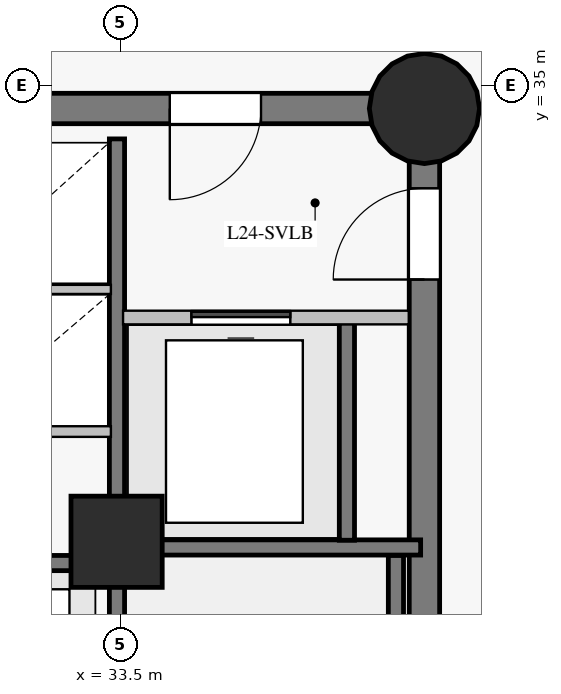
"""IFC4 building model, lengths in metres.
Left out: names, types, materials, properties, quantities, classifications, styles, units other than length and angle.
Written with IfcOpenShell. Run it as: python <this file> out.ifc"""

import sys

from ifc_helpers import new_model, si_unit, direction, frame, frame_2d, origin, origin_with_axes, origin_2d, place, context, subcontext, project, spatial, rectangle, circle, extrude, source, transform, mapped, element, fill, save


model = new_model("IFC4")
c1 = context("Model", 3, precision=1e-05, world=origin(), true_north=direction((0.0, 1.0)))
c2 = subcontext(c1, "Body", "Model", "MODEL_VIEW")
j1 = project(units=[si_unit("LENGTHUNIT", "METRE"), si_unit("PLANEANGLEUNIT", "RADIAN")], contexts=[c1])
p1 = place(None, origin())
s1 = spatial("IfcSite", under=j1, at=p1, CompositionType="ELEMENT")
p2 = place(p1, origin())
s2 = spatial("IfcBuilding", under=s1, at=p2, CompositionType="ELEMENT")
p3 = place(p2, frame((0.0, 0.0, 92.2)))
s3 = spatial("IfcBuildingStorey", under=s2, at=p3, CompositionType="ELEMENT", Elevation=92.2)
p4 = place(p3, frame((37.5, 18.3, 0.0), z_axis=(0.0, 0.0, 1.0), x_axis=(0.0, 1.0, 0.0)))
e1 = element("IfcWall", 1, at=p4, inside=s3, PredefinedType="SHEAR", context=c2, shape_type="SweptSolid", body=[
    extrude(rectangle(XDim=16.4, YDim=0.4, at=frame_2d((8.2, 0.0))), origin(), (0.0, 0.0, 1.0), 3.775),
])
p5 = place(p4, frame((14.15, 0.0, 0.0)))
e2 = element("IfcOpeningElement", 2, at=p5, cuts=e1, PredefinedType="OPENING", context=c2, shape_type="SweptSolid", body=[
    extrude(rectangle(XDim=1.2, YDim=2.15, at=frame_2d((0.6, 1.075))), frame((0.0, 0.21, 0.0), z_axis=(0.0, -1.0, 0.0), x_axis=(1.0, 0.0, 0.0)), (0.0, 0.0, 1.0), 0.42),
])
p6 = place(p3, frame((37.5, 34.7, 0.0), z_axis=(0.0, 0.0, 1.0), x_axis=(-1.0, 0.0, 0.0)))
e3 = element("IfcWall", 3, at=p6, inside=s3, PredefinedType="SHEAR", context=c2, shape_type="SweptSolid", body=[
    extrude(rectangle(XDim=10.95, YDim=0.4, at=frame_2d((5.475, 0.0))), origin(), (0.0, 0.0, 1.0), 3.775),
])
p7 = place(p6, frame((2.15, 0.0, 0.0)))
e4 = element("IfcOpeningElement", 4, at=p7, cuts=e3, PredefinedType="OPENING", context=c2, shape_type="SweptSolid", body=[
    extrude(rectangle(XDim=1.2, YDim=2.15, at=frame_2d((0.6, 1.075))), frame((0.0, 0.21, 0.0), z_axis=(0.0, -1.0, 0.0), x_axis=(1.0, 0.0, 0.0)), (0.0, 0.0, 1.0), 0.42),
])
p8 = place(p6, frame((6.35, 0.0, 0.0)))
e5 = element("IfcOpeningElement", 5, at=p8, cuts=e3, PredefinedType="OPENING", context=c2, shape_type="SweptSolid", body=[
    extrude(rectangle(XDim=1.1, YDim=2.15, at=frame_2d((0.55, 1.075))), frame((0.0, 0.21, 0.0), z_axis=(0.0, -1.0, 0.0), x_axis=(1.0, 0.0, 0.0)), (0.0, 0.0, 1.0), 0.42),
])
m1 = source(origin_with_axes(), c2, "Body", "SweptSolid", [
    extrude(circle(Radius=0.725, at=origin_2d()), origin(), (0.0, 0.0, 1.0), 4.0),
])
p9 = place(p3, frame((37.5, 34.7, 0.0), z_axis=(0.0, 0.0, 1.0), x_axis=(1.0, 0.0, 0.0)))
e6 = element("IfcColumn", 6, at=p9, inside=s3, PredefinedType="COLUMN", context=c2, shape_type="MappedRepresentation", body=[
    mapped(m1, transform((0.0, 0.0, 0.0), scale=1.0)),
])
m2 = source(origin_with_axes(), c2, "Body", "SweptSolid", [
    extrude(rectangle(XDim=1.2, YDim=1.2, at=origin_2d()), origin(), (0.0, 0.0, 1.0), 4.0),
])
p10 = place(p3, frame((33.45, 29.0, 0.0), z_axis=(0.0, 0.0, 1.0), x_axis=(1.0, 0.0, 0.0)))
e7 = element("IfcColumn", 7, at=p10, inside=s3, PredefinedType="COLUMN", context=c2, shape_type="MappedRepresentation", body=[
    mapped(m2, transform((0.0, 0.0, 0.0), scale=1.0)),
])
p11 = place(p3, frame((33.455, 18.7, 0.0), z_axis=(0.0, 0.0, 1.0), x_axis=(0.0, 1.0, 0.0)))
e8 = element("IfcWall", 8, at=p11, inside=s3, PredefinedType="SHEAR", context=c2, shape_type="SweptSolid", body=[
    extrude(rectangle(XDim=15.6, YDim=0.2, at=frame_2d((7.8, 0.0))), origin(), (0.0, 0.0, 1.0), 3.775),
])
p12 = place(p11, frame((2.75, 0.0, 0.0)))
e9 = element("IfcOpeningElement", 9, at=p12, cuts=e8, PredefinedType="OPENING", context=c2, shape_type="SweptSolid", body=[
    extrude(rectangle(XDim=1.15, YDim=2.15, at=frame_2d((0.575, 1.075))), frame((0.0, 0.11, 0.0), z_axis=(0.0, -1.0, 0.0), x_axis=(1.0, 0.0, 0.0)), (0.0, 0.0, 1.0), 0.22),
])
p13 = place(p11, frame((0.55, 0.0, 0.0)))
e10 = element("IfcOpeningElement", 10, at=p13, cuts=e8, PredefinedType="OPENING", context=c2, shape_type="SweptSolid", body=[
    extrude(rectangle(XDim=0.94, YDim=2.1, at=frame_2d((0.47, 1.05))), frame((0.0, 0.11, 0.0), z_axis=(0.0, -1.0, 0.0), x_axis=(1.0, 0.0, 0.0)), (0.0, 0.0, 1.0), 0.22),
])
p14 = place(p3, frame((23.7, 28.72, 0.0), z_axis=(0.0, 0.0, 1.0), x_axis=(1.0, 0.0, 0.0)))
e11 = element("IfcWall", 11, at=p14, inside=s3, PredefinedType="SHEAR", context=c2, shape_type="SweptSolid", body=[
    extrude(rectangle(XDim=9.6, YDim=0.2, at=frame_2d((4.8, 0.0))), origin(), (0.0, 0.0, 1.0), 3.775),
])
p15 = place(p14, frame((0.6, 0.0, 0.0)))
e12 = element("IfcOpeningElement", 12, at=p15, cuts=e11, PredefinedType="OPENING", context=c2, shape_type="SweptSolid", body=[
    extrude(rectangle(XDim=1.1, YDim=2.15, at=frame_2d((0.55, 1.075))), frame((0.0, 0.11, 0.0), z_axis=(0.0, -1.0, 0.0), x_axis=(1.0, 0.0, 0.0)), (0.0, 0.0, 1.0), 0.22),
])
p16 = place(p14, frame((2.98, 0.0, 0.0)))
e13 = element("IfcOpeningElement", 13, at=p16, cuts=e11, PredefinedType="OPENING", context=c2, shape_type="SweptSolid", body=[
    extrude(rectangle(XDim=1.1, YDim=2.15, at=frame_2d((0.55, 1.075))), frame((0.0, 0.11, 0.0), z_axis=(0.0, -1.0, 0.0), x_axis=(1.0, 0.0, 0.0)), (0.0, 0.0, 1.0), 0.22),
])
p17 = place(p14, frame((5.36, 0.0, 0.0)))
e14 = element("IfcOpeningElement", 14, at=p17, cuts=e11, PredefinedType="OPENING", context=c2, shape_type="SweptSolid", body=[
    extrude(rectangle(XDim=1.1, YDim=2.15, at=frame_2d((0.55, 1.075))), frame((0.0, 0.11, 0.0), z_axis=(0.0, -1.0, 0.0), x_axis=(1.0, 0.0, 0.0)), (0.0, 0.0, 1.0), 0.22),
])
p18 = place(p14, frame((7.74, 0.0, 0.0)))
e15 = element("IfcOpeningElement", 15, at=p18, cuts=e11, PredefinedType="OPENING", context=c2, shape_type="SweptSolid", body=[
    extrude(rectangle(XDim=1.1, YDim=2.15, at=frame_2d((0.55, 1.075))), frame((0.0, 0.11, 0.0), z_axis=(0.0, -1.0, 0.0), x_axis=(1.0, 0.0, 0.0)), (0.0, 0.0, 1.0), 0.22),
])
p19 = place(p3, frame((37.125, 21.32, 0.0), z_axis=(0.0, 0.0, 1.0), x_axis=(0.0, 1.0, 0.0)))
e16 = element("IfcWall", 16, at=p19, inside=s3, PredefinedType="SHEAR", context=c2, shape_type="SweptSolid", body=[
    extrude(rectangle(XDim=7.5, YDim=0.2, at=frame_2d((3.75, 0.0))), origin(), (0.0, 0.0, 1.0), 3.775),
])
p20 = place(p3, frame((33.455, 28.925, 0.0), z_axis=(0.0, 0.0, 1.0), x_axis=(1.0, 0.0, 0.0)))
e17 = element("IfcWall", 17, at=p20, inside=s3, PredefinedType="SHEAR", context=c2, shape_type="SweptSolid", body=[
    extrude(rectangle(XDim=3.995, YDim=0.2, at=frame_2d((1.998, 0.0))), origin(), (0.0, 0.0, 1.0), 3.775),
])
p21 = place(p3, frame((36.48, 29.02, 0.0), z_axis=(0.0, 0.0, 1.0), x_axis=(0.0, 1.0, 0.0)))
e18 = element("IfcWall", 18, at=p21, inside=s3, PredefinedType="SHEAR", context=c2, shape_type="SweptSolid", body=[
    extrude(rectangle(XDim=2.86, YDim=0.2, at=frame_2d((1.43, 0.0))), origin(), (0.0, 0.0, 1.0), 3.775),
])
p22 = place(p3, frame((33.535, 31.95, 0.0), z_axis=(0.0, 0.0, 1.0), x_axis=(1.0, 0.0, 0.0)))
e19 = element("IfcWall", 19, at=p22, inside=s3, PredefinedType="PARTITIONING", context=c2, shape_type="SweptSolid", body=[
    extrude(rectangle(XDim=3.759, YDim=0.18, at=frame_2d((1.879, 0.0))), origin(), (0.0, 0.0, 1.0), 3.775),
])
p23 = place(p22, frame((0.9, 0.0, 0.0)))
e20 = element("IfcOpeningElement", 20, at=p23, cuts=e19, PredefinedType="OPENING", context=c2, shape_type="SweptSolid", body=[
    extrude(rectangle(XDim=1.3, YDim=2.2, at=frame_2d((0.65, 1.1))), frame((0.0, 0.1, 0.0), z_axis=(0.0, -1.0, 0.0), x_axis=(1.0, 0.0, 0.0)), (0.0, 0.0, 1.0), 0.2),
])
p24 = place(p3, frame((31.3, 30.45, 0.0), z_axis=(0.0, 0.0, 1.0), x_axis=(1.0, 0.0, 0.0)))
e21 = element("IfcWall", 21, at=p24, inside=s3, PredefinedType="PARTITIONING", context=c2, shape_type="SweptSolid", body=[
    extrude(rectangle(XDim=2.075, YDim=0.14, at=frame_2d((1.038, 0.0))), origin(), (0.0, 0.0, 1.0), 3.775),
])
p25 = place(p3, frame((31.3, 32.32, 0.0), z_axis=(0.0, 0.0, 1.0), x_axis=(1.0, 0.0, 0.0)))
e22 = element("IfcWall", 22, at=p25, inside=s3, PredefinedType="PARTITIONING", context=c2, shape_type="SweptSolid", body=[
    extrude(rectangle(XDim=2.075, YDim=0.12, at=frame_2d((1.038, 0.0))), origin(), (0.0, 0.0, 1.0), 3.775),
])
m3 = source(origin_with_axes(), c2, "Body", "SweptSolid", [
    extrude(rectangle(XDim=1.2, YDim=2.15, at=frame_2d((0.6, 1.075))), frame((0.0, 0.025, 0.0), z_axis=(0.0, -1.0, 0.0), x_axis=(1.0, 0.0, 0.0)), (0.0, 0.0, 1.0), 0.05),
])
p26 = place(p5, origin())
e23 = element("IfcDoor", 23, at=p26, inside=s3, OperationType="SINGLE_SWING_LEFT", PredefinedType="DOOR", context=c2, shape_type="MappedRepresentation", body=[
    mapped(m3, transform((0.0, 0.0, 0.0), scale=1.0)),
])
fill(e2, e23)
p27 = place(p7, origin())
e24 = element("IfcDoor", 24, at=p27, inside=s3, OperationType="SINGLE_SWING_RIGHT", PredefinedType="DOOR", context=c2, shape_type="MappedRepresentation", body=[
    mapped(m3, transform((0.0, 0.0, 0.0), scale=1.0)),
])
fill(e4, e24)
m4 = source(origin_with_axes(), c2, "Body", "SweptSolid", [
    extrude(rectangle(XDim=1.3, YDim=2.2, at=frame_2d((0.65, 1.1))), frame((0.0, 0.025, 0.0), z_axis=(0.0, -1.0, 0.0), x_axis=(1.0, 0.0, 0.0)), (0.0, 0.0, 1.0), 0.05),
])
p28 = place(p23, origin())
e25 = element("IfcDoor", 25, at=p28, inside=s3, OperationType="SLIDING_TO_LEFT", PredefinedType="DOOR", context=c2, shape_type="MappedRepresentation", body=[
    mapped(m4, transform((0.0, 0.0, 0.0), scale=1.0)),
])
fill(e20, e25)
save(model, sys.argv[1])
